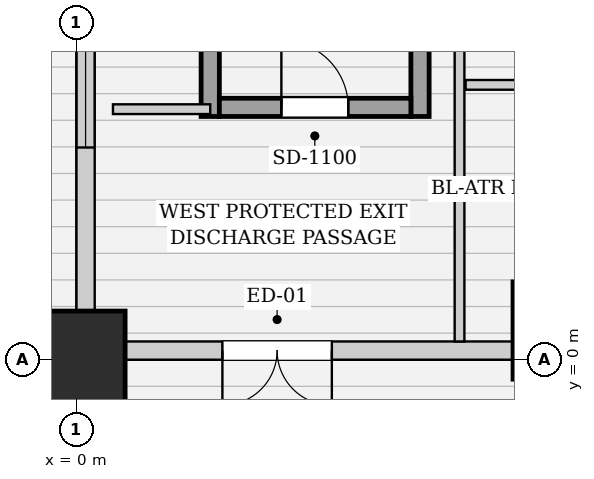
"""IFC4 building model, lengths in metres.
Left out: names, types, materials, properties, quantities, classifications, styles, units other than length and angle.
Written with IfcOpenShell. Run it as: python <this file> out.ifc"""

import sys

from ifc_helpers import new_model, si_unit, direction, frame, frame_2d, origin, origin_2d, place, context, subcontext, project, spatial, rectangle, extrude, element, fill, save


model = new_model("IFC4")
c1 = context("Model", 3, precision=1e-05, world=origin(), true_north=direction((0.0, 1.0)))
c2 = subcontext(c1, "Body", "Model", "MODEL_VIEW")
j1 = project(units=[si_unit("LENGTHUNIT", "METRE"), si_unit("PLANEANGLEUNIT", "RADIAN")], contexts=[c1])
p1 = place(None, origin())
s1 = spatial("IfcSite", under=j1, at=p1, CompositionType="ELEMENT")
p2 = place(p1, origin())
s2 = spatial("IfcBuilding", under=s1, at=p2, CompositionType="ELEMENT")
p3 = place(p2, origin())
s3 = spatial("IfcBuildingStorey", under=s2, at=p3, CompositionType="ELEMENT", Elevation=0.0)
for number, where, z_axis, x_axis in (
    (1, (0.0, 0.0, 0.0), (0.0, 0.0, 1.0), (1.0, 0.0, 0.0)),
    (2, (7.98, 0.48, 0.0), (0.0, 0.0, 1.0), (1.0, 0.0, 0.0)),
):
    element("IfcColumn", number, at=place(p3, frame(where, z_axis=z_axis, x_axis=x_axis)), inside=s3, PredefinedType="COLUMN", context=c2, shape_type="SweptSolid", body=[
        extrude(rectangle(XDim=1.6, YDim=1.6, at=origin_2d()), origin(), (0.0, 0.0, 1.0), 6.0),
    ])
p4 = place(p3, frame((53.84, 0.15, 0.0), z_axis=(0.0, 0.0, 1.0), x_axis=(-1.0, 0.0, 0.0)))
e3 = element("IfcWall", 3, at=p4, inside=s3, PredefinedType="SOLIDWALL", context=c2, shape_type="SweptSolid", body=[
    extrude(rectangle(XDim=53.68, YDim=0.3, at=frame_2d((26.84, 0.0))), origin(), (0.0, 0.0, 1.0), 4.565),
])
p5 = place(p4, frame((24.54, 0.0, 0.0)))
e4 = element("IfcOpeningElement", 4, at=p5, cuts=e3, PredefinedType="OPENING", context=c2, shape_type="SweptSolid", body=[
    extrude(rectangle(XDim=1.8, YDim=2.2, at=frame_2d((0.9, 1.1))), frame((0.0, 0.16, 0.0), z_axis=(0.0, -1.0, 0.0), x_axis=(1.0, 0.0, 0.0)), (0.0, 0.0, 1.0), 0.32),
])
p6 = place(p4, frame((49.64, 0.0, 0.0)))
e5 = element("IfcOpeningElement", 5, at=p6, cuts=e3, PredefinedType="OPENING", context=c2, shape_type="SweptSolid", body=[
    extrude(rectangle(XDim=1.8, YDim=2.2, at=frame_2d((0.9, 1.1))), frame((0.0, 0.16, 0.0), z_axis=(0.0, -1.0, 0.0), x_axis=(1.0, 0.0, 0.0)), (0.0, 0.0, 1.0), 0.32),
])
p7 = place(p4, frame((40.04, 0.0, 0.0)))
e6 = element("IfcOpeningElement", 6, at=p7, cuts=e3, PredefinedType="OPENING", context=c2, shape_type="SweptSolid", body=[
    extrude(rectangle(XDim=1.8, YDim=2.2, at=frame_2d((0.9, 1.1))), frame((0.0, 0.16, 0.0), z_axis=(0.0, -1.0, 0.0), x_axis=(1.0, 0.0, 0.0)), (0.0, 0.0, 1.0), 0.32),
])
p8 = place(p4, frame((13.34, 0.0, 0.0)))
e7 = element("IfcOpeningElement", 7, at=p8, cuts=e3, PredefinedType="OPENING", context=c2, shape_type="SweptSolid", body=[
    extrude(rectangle(XDim=1.8, YDim=2.2, at=frame_2d((0.9, 1.1))), frame((0.0, 0.16, 0.0), z_axis=(0.0, -1.0, 0.0), x_axis=(1.0, 0.0, 0.0)), (0.0, 0.0, 1.0), 0.32),
])
p9 = place(p4, frame((4.0, 0.0, 0.9)))
e8 = element("IfcOpeningElement", 8, at=p9, cuts=e3, PredefinedType="OPENING", context=c2, shape_type="SweptSolid", body=[
    extrude(rectangle(XDim=2.7, YDim=2.1, at=frame_2d((1.35, 1.05))), frame((0.0, 0.16, 0.0), z_axis=(0.0, -1.0, 0.0), x_axis=(1.0, 0.0, 0.0)), (0.0, 0.0, 1.0), 0.32),
])
p10 = place(p4, frame((10.38, 0.0, 0.9)))
e9 = element("IfcOpeningElement", 9, at=p10, cuts=e3, PredefinedType="OPENING", context=c2, shape_type="SweptSolid", body=[
    extrude(rectangle(XDim=2.7, YDim=2.1, at=frame_2d((1.35, 1.05))), frame((0.0, 0.16, 0.0), z_axis=(0.0, -1.0, 0.0), x_axis=(1.0, 0.0, 0.0)), (0.0, 0.0, 1.0), 0.32),
])
p11 = place(p4, frame((17.58, 0.0, 0.85)))
e10 = element("IfcOpeningElement", 10, at=p11, cuts=e3, PredefinedType="OPENING", context=c2, shape_type="SweptSolid", body=[
    extrude(rectangle(XDim=2.1, YDim=1.85, at=frame_2d((1.05, 0.925))), frame((0.0, 0.16, 0.0), z_axis=(0.0, -1.0, 0.0), x_axis=(1.0, 0.0, 0.0)), (0.0, 0.0, 1.0), 0.32),
])
p12 = place(p4, frame((37.0, 0.0, 0.9)))
e11 = element("IfcOpeningElement", 11, at=p12, cuts=e3, PredefinedType="OPENING", context=c2, shape_type="SweptSolid", body=[
    extrude(rectangle(XDim=2.7, YDim=2.1, at=frame_2d((1.35, 1.05))), frame((0.0, 0.16, 0.0), z_axis=(0.0, -1.0, 0.0), x_axis=(1.0, 0.0, 0.0)), (0.0, 0.0, 1.0), 0.32),
])
p13 = place(p4, frame((42.2, 0.0, 0.9)))
e12 = element("IfcOpeningElement", 12, at=p13, cuts=e3, PredefinedType="OPENING", context=c2, shape_type="SweptSolid", body=[
    extrude(rectangle(XDim=2.7, YDim=2.1, at=frame_2d((1.35, 1.05))), frame((0.0, 0.16, 0.0), z_axis=(0.0, -1.0, 0.0), x_axis=(1.0, 0.0, 0.0)), (0.0, 0.0, 1.0), 0.32),
])
p14 = place(p3, frame((0.15, 0.16, 0.0), z_axis=(0.0, 0.0, 1.0), x_axis=(0.0, 1.0, 0.0)))
e13 = element("IfcWall", 13, at=p14, inside=s3, PredefinedType="SOLIDWALL", context=c2, shape_type="SweptSolid", body=[
    extrude(rectangle(XDim=47.28, YDim=0.3, at=frame_2d((23.64, 0.0))), origin(), (0.0, 0.0, 1.0), 4.565),
])
p15 = place(p14, frame((17.46, 0.0, 0.0)))
e14 = element("IfcOpeningElement", 14, at=p15, cuts=e13, PredefinedType="OPENING", context=c2, shape_type="SweptSolid", body=[
    extrude(rectangle(XDim=1.8, YDim=2.2, at=frame_2d((0.9, 1.1))), frame((0.0, 0.16, 0.0), z_axis=(0.0, -1.0, 0.0), x_axis=(1.0, 0.0, 0.0)), (0.0, 0.0, 1.0), 0.32),
])
p16 = place(p14, frame((3.33, 0.0, 0.9)))
e15 = element("IfcOpeningElement", 15, at=p16, cuts=e13, PredefinedType="OPENING", context=c2, shape_type="SweptSolid", body=[
    extrude(rectangle(XDim=2.7, YDim=2.1, at=frame_2d((1.35, 1.05))), frame((0.0, 0.16, 0.0), z_axis=(0.0, -1.0, 0.0), x_axis=(1.0, 0.0, 0.0)), (0.0, 0.0, 1.0), 0.32),
])
p17 = place(p14, frame((9.78, 0.0, 0.9)))
e16 = element("IfcOpeningElement", 16, at=p17, cuts=e13, PredefinedType="OPENING", context=c2, shape_type="SweptSolid", body=[
    extrude(rectangle(XDim=2.7, YDim=2.1, at=frame_2d((1.35, 1.05))), frame((0.0, 0.16, 0.0), z_axis=(0.0, -1.0, 0.0), x_axis=(1.0, 0.0, 0.0)), (0.0, 0.0, 1.0), 0.32),
])
p18 = place(p14, frame((36.5, 0.0, 0.9)))
e17 = element("IfcOpeningElement", 17, at=p18, cuts=e13, PredefinedType="OPENING", context=c2, shape_type="SweptSolid", body=[
    extrude(rectangle(XDim=2.7, YDim=2.1, at=frame_2d((1.35, 1.05))), frame((0.0, 0.16, 0.0), z_axis=(0.0, -1.0, 0.0), x_axis=(1.0, 0.0, 0.0)), (0.0, 0.0, 1.0), 0.32),
])
p19 = place(p14, frame((43.0, 0.0, 0.9)))
e18 = element("IfcOpeningElement", 18, at=p19, cuts=e13, PredefinedType="OPENING", context=c2, shape_type="SweptSolid", body=[
    extrude(rectangle(XDim=2.7, YDim=2.1, at=frame_2d((1.35, 1.05))), frame((0.0, 0.16, 0.0), z_axis=(0.0, -1.0, 0.0), x_axis=(1.0, 0.0, 0.0)), (0.0, 0.0, 1.0), 0.32),
])
for number, where, z_axis, x_axis in (
    (19, (2.2, 4.0, 0.0), (0.0, 0.0, 1.0), (0.0, 1.0, 0.0)),
    (20, (5.65, 4.0, 0.0), (0.0, 0.0, 1.0), (0.0, 1.0, 0.0)),
):
    element("IfcWall", number, at=place(p3, frame(where, z_axis=z_axis, x_axis=x_axis)), inside=s3, PredefinedType="SHEAR", context=c2, shape_type="SweptSolid", body=[
        extrude(rectangle(XDim=9.8, YDim=0.3, at=frame_2d((4.9, 0.0))), origin(), (0.0, 0.0, 1.0), 5.68),
    ])
p20 = place(p3, frame((2.35, 4.15, 0.0), z_axis=(0.0, 0.0, 1.0), x_axis=(1.0, 0.0, 0.0)))
e21 = element("IfcWall", 21, at=p20, inside=s3, PredefinedType="SHEAR", context=c2, shape_type="SweptSolid", body=[
    extrude(rectangle(XDim=3.15, YDim=0.3, at=frame_2d((1.575, 0.0))), origin(), (0.0, 0.0, 1.0), 5.68),
])
p21 = place(p20, frame((1.02, 0.0, 0.0)))
e22 = element("IfcOpeningElement", 22, at=p21, cuts=e21, PredefinedType="OPENING", context=c2, shape_type="SweptSolid", body=[
    extrude(rectangle(XDim=1.1, YDim=2.05, at=frame_2d((0.55, 1.025))), frame((0.0, 0.16, 0.0), z_axis=(0.0, -1.0, 0.0), x_axis=(1.0, 0.0, 0.0)), (0.0, 0.0, 1.0), 0.32),
])
p22 = place(p3, frame((6.4, 4.52, 0.0), z_axis=(0.0, 0.0, 1.0), x_axis=(1.0, 0.0, 0.0)))
e23 = element("IfcWall", 23, at=p22, inside=s3, PredefinedType="PARTITIONING", context=c2, shape_type="SweptSolid", body=[
    extrude(rectangle(XDim=40.9, YDim=0.16, at=frame_2d((20.45, 0.0))), origin(), (0.0, 0.0, 1.0), 5.68),
])
p23 = place(p3, frame((0.6, 4.12, 0.0), z_axis=(0.0, 0.0, 1.0), x_axis=(1.0, 0.0, 0.0)))
e24 = element("IfcWall", 24, at=p23, inside=s3, PredefinedType="PARTITIONING", context=c2, shape_type="SweptSolid", body=[
    extrude(rectangle(XDim=1.6, YDim=0.16, at=frame_2d((0.8, 0.0))), origin(), (0.0, 0.0, 1.0), 5.68),
])
p24 = place(p3, frame((6.3, 0.3, 0.0), z_axis=(0.0, 0.0, 1.0), x_axis=(0.0, 1.0, 0.0)))
e25 = element("IfcWall", 25, at=p24, inside=s3, PredefinedType="PARTITIONING", context=c2, shape_type="SweptSolid", body=[
    extrude(rectangle(XDim=14.68, YDim=0.16, at=frame_2d((7.34, 0.0))), origin(), (0.0, 0.0, 1.0), 5.68),
])
p25 = place(p6, origin())
e26 = element("IfcDoor", 26, at=p25, inside=s3, OperationType="DOUBLE_SWING_LEFT", PredefinedType="DOOR", context=c2, shape_type="SweptSolid", body=[
    extrude(rectangle(XDim=1.8, YDim=2.2, at=frame_2d((0.9, 1.1))), frame((0.0, 0.025, 0.0), z_axis=(0.0, -1.0, 0.0), x_axis=(1.0, 0.0, 0.0)), (0.0, 0.0, 1.0), 0.05),
])
fill(e5, e26)
p26 = place(p21, origin())
e27 = element("IfcDoor", 27, at=p26, inside=s3, OperationType="SINGLE_SWING_LEFT", PredefinedType="DOOR", context=c2, shape_type="SweptSolid", body=[
    extrude(rectangle(XDim=1.1, YDim=2.05, at=frame_2d((0.55, 1.025))), frame((0.0, 0.025, 0.0), z_axis=(0.0, -1.0, 0.0), x_axis=(1.0, 0.0, 0.0)), (0.0, 0.0, 1.0), 0.05),
])
fill(e22, e27)
p27 = place(p16, origin())
e28 = element("IfcWindow", 28, at=p27, inside=s3, PartitioningType="TRIPLE_PANEL_VERTICAL", PredefinedType="WINDOW", context=c2, shape_type="SweptSolid", body=[
    extrude(rectangle(XDim=2.7, YDim=2.1, at=frame_2d((1.35, 1.05))), frame((0.0, 0.03, 0.0), z_axis=(0.0, -1.0, 0.0), x_axis=(1.0, 0.0, 0.0)), (0.0, 0.0, 1.0), 0.06),
])
fill(e15, e28)
save(model, sys.argv[1])
